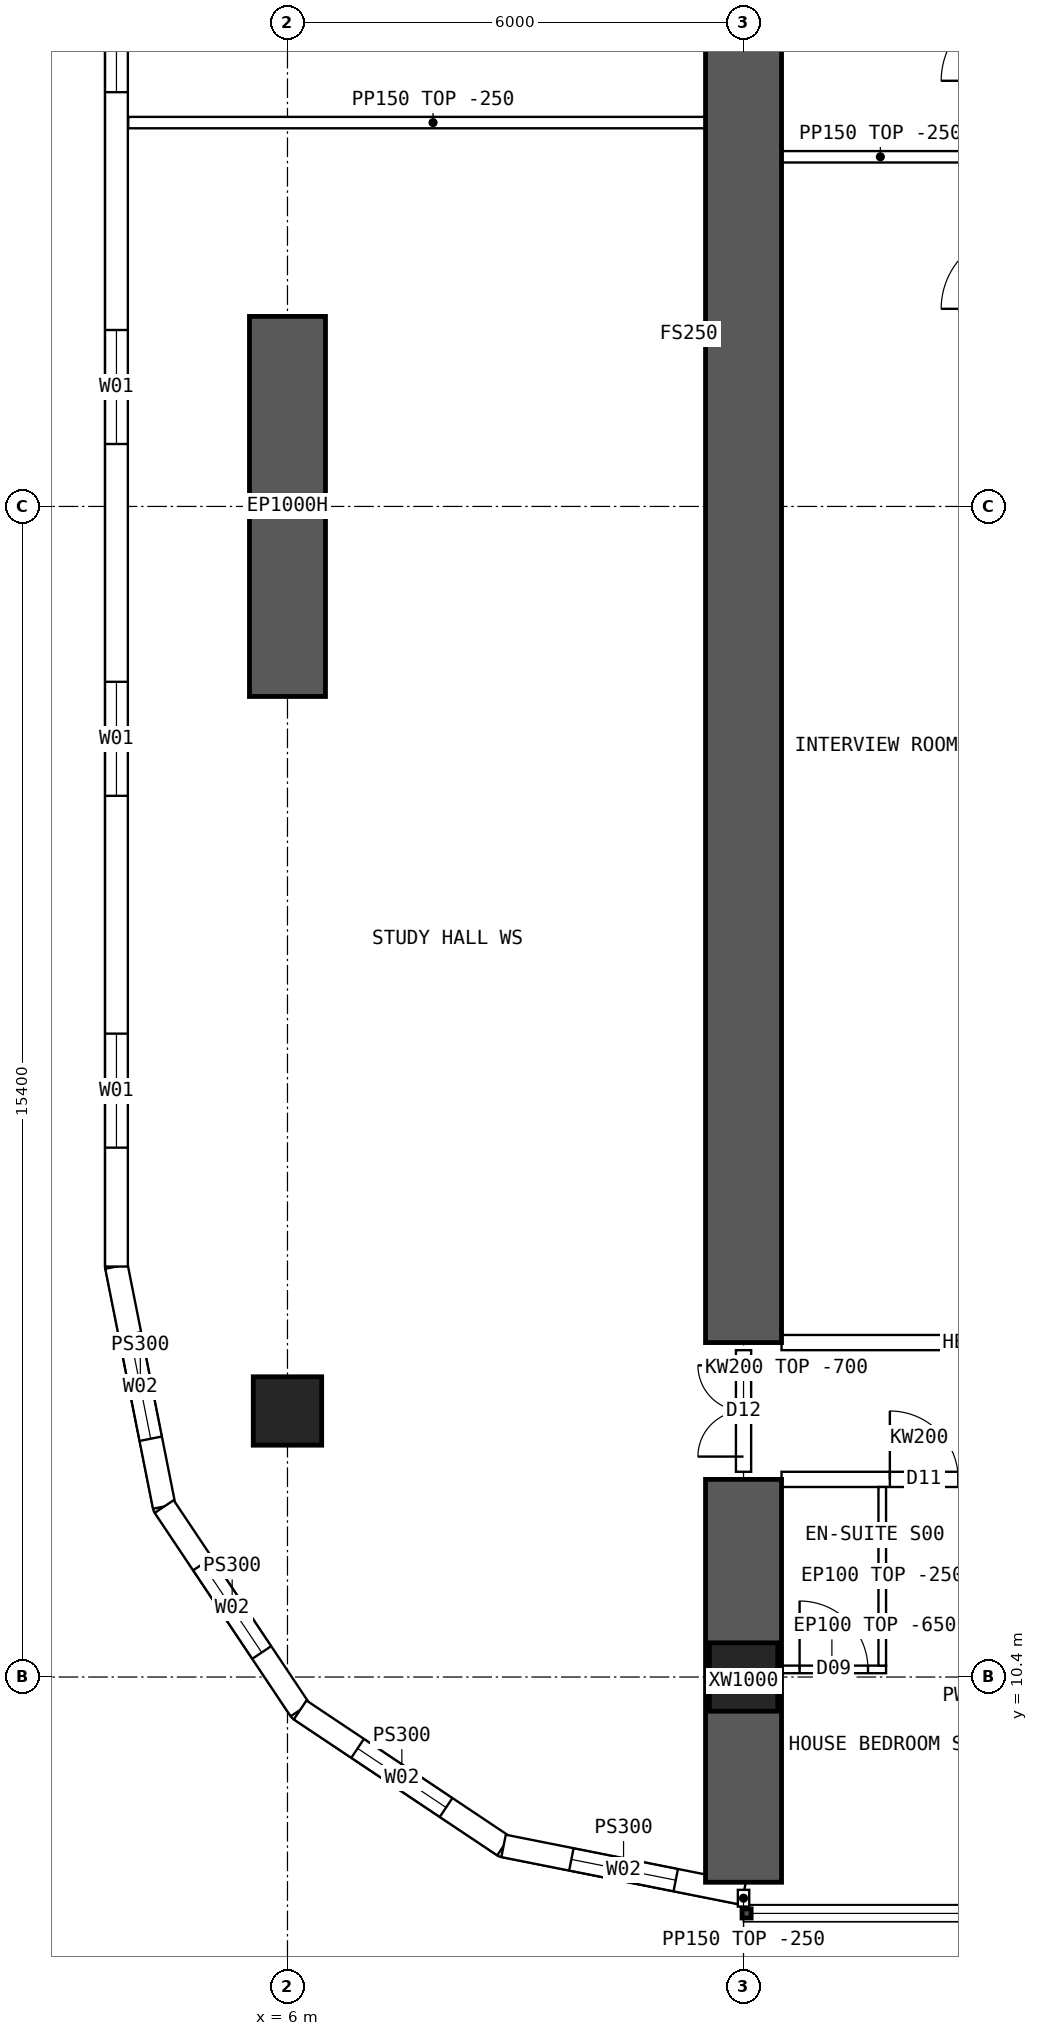
"""IFC4 building model, lengths in metres.
Left out: names, types, materials, properties, quantities, classifications, styles, units other than length and angle.
Written with IfcOpenShell. Run it as: python <this file> out.ifc"""

import sys

from ifc_helpers import new_model, si_unit, direction, frame, frame_2d, origin, origin_2d, place, context, subcontext, project, spatial, polyline, rectangle, hollow_rectangle, outline, extrude, element, fill, save


model = new_model("IFC4")
c1 = context("Model", 3, precision=1e-05, world=origin(), true_north=direction((0.0, 1.0)))
c2 = subcontext(c1, "Body", "Model", "MODEL_VIEW")
j1 = project(units=[si_unit("LENGTHUNIT", "METRE"), si_unit("PLANEANGLEUNIT", "RADIAN")], contexts=[c1])
p1 = place(None, origin())
s1 = spatial("IfcSite", under=j1, at=p1, CompositionType="ELEMENT")
p2 = place(p1, origin())
s2 = spatial("IfcBuilding", under=s1, at=p2, CompositionType="ELEMENT")
p3 = place(p2, frame((0.0, 0.0, 27.7)))
s3 = spatial("IfcBuildingStorey", under=s2, at=p3, CompositionType="ELEMENT", Elevation=27.7)
for number, where, z_axis, x_axis in (
    (1, (12.0, 10.4, 0.0), (0.0, 0.0, 1.0), (1.0, 0.0, 0.0)),
    (2, (6.0, 13.9, 0.0), (0.0, 0.0, 1.0), (1.0, 0.0, 0.0)),
):
    element("IfcColumn", number, at=place(p3, frame(where, z_axis=z_axis, x_axis=x_axis)), inside=s3, PredefinedType="COLUMN", context=c2, shape_type="SweptSolid", body=[
        extrude(hollow_rectangle(XDim=0.9, YDim=0.9, WallThickness=0.09, at=origin_2d()), origin(), (0.0, 0.0, 1.0), 3.75),
    ])
p4 = place(p3, frame((6.0, 23.3, 0.0), z_axis=(0.0, 0.0, 1.0), x_axis=(0.0, 1.0, 0.0)))
e3 = element("IfcWall", 3, at=p4, inside=s3, PredefinedType="SHEAR", context=c2, shape_type="SweptSolid", body=[
    extrude(rectangle(XDim=5.0, YDim=1.0, at=frame_2d((2.5, 0.0))), origin(), (0.0, 0.0, 1.0), 3.75),
])
p5 = place(p3, frame((12.0, 7.7, 0.0), z_axis=(0.0, 0.0, 1.0), x_axis=(0.0, 1.0, 0.0)))
e4 = element("IfcWall", 4, at=p5, inside=s3, PredefinedType="SHEAR", context=c2, shape_type="SweptSolid", body=[
    extrude(rectangle(XDim=5.3, YDim=1.0, at=frame_2d((2.65, 0.0))), origin(), (0.0, 0.0, 1.0), 3.75),
])
p6 = place(p3, frame((12.0, 14.8, 0.0), z_axis=(0.0, 0.0, 1.0), x_axis=(0.0, 1.0, 0.0)))
e5 = element("IfcWall", 5, at=p6, inside=s3, PredefinedType="SHEAR", context=c2, shape_type="SweptSolid", body=[
    extrude(rectangle(XDim=34.4, YDim=1.0, at=frame_2d((17.2, 0.0))), origin(), (0.0, 0.0, 1.0), 3.75),
])
p7 = place(p3, frame((3.75, 48.2, 0.0), z_axis=(0.0, 0.0, 1.0), x_axis=(0.0, -1.0, 0.0)))
e6 = element("IfcWall", 6, at=p7, inside=s3, PredefinedType="SOLIDWALL", context=c2, shape_type="SweptSolid", body=[
    extrude(outline(polyline([(-0.015, -0.15), (32.415, -0.15), (32.385, 0.15), (0.015, 0.15), (-0.015, -0.15)])), origin(), (0.0, 0.0, 1.0), 3.5),
])
p8 = place(p7, frame((1.564, 0.0, 0.9)))
e7 = element("IfcOpeningElement", 7, at=p8, cuts=e6, PredefinedType="OPENING", context=c2, shape_type="SweptSolid", body=[
    extrude(rectangle(XDim=1.5, YDim=2.0, at=frame_2d((0.75, 1.0))), frame((0.0, 0.16, 0.0), z_axis=(0.0, -1.0, 0.0), x_axis=(1.0, 0.0, 0.0)), (0.0, 0.0, 1.0), 0.32),
])
p9 = place(p7, frame((6.193, 0.0, 0.9)))
e8 = element("IfcOpeningElement", 8, at=p9, cuts=e6, PredefinedType="OPENING", context=c2, shape_type="SweptSolid", body=[
    extrude(rectangle(XDim=1.5, YDim=2.0, at=frame_2d((0.75, 1.0))), frame((0.0, 0.16, 0.0), z_axis=(0.0, -1.0, 0.0), x_axis=(1.0, 0.0, 0.0)), (0.0, 0.0, 1.0), 0.32),
])
p10 = place(p7, frame((10.822, 0.0, 0.9)))
e9 = element("IfcOpeningElement", 9, at=p10, cuts=e6, PredefinedType="OPENING", context=c2, shape_type="SweptSolid", body=[
    extrude(rectangle(XDim=1.5, YDim=2.0, at=frame_2d((0.75, 1.0))), frame((0.0, 0.16, 0.0), z_axis=(0.0, -1.0, 0.0), x_axis=(1.0, 0.0, 0.0)), (0.0, 0.0, 1.0), 0.32),
])
p11 = place(p7, frame((15.45, 0.0, 0.9)))
e10 = element("IfcOpeningElement", 10, at=p11, cuts=e6, PredefinedType="OPENING", context=c2, shape_type="SweptSolid", body=[
    extrude(rectangle(XDim=1.5, YDim=2.0, at=frame_2d((0.75, 1.0))), frame((0.0, 0.16, 0.0), z_axis=(0.0, -1.0, 0.0), x_axis=(1.0, 0.0, 0.0)), (0.0, 0.0, 1.0), 0.32),
])
p12 = place(p7, frame((20.079, 0.0, 0.9)))
e11 = element("IfcOpeningElement", 11, at=p12, cuts=e6, PredefinedType="OPENING", context=c2, shape_type="SweptSolid", body=[
    extrude(rectangle(XDim=1.5, YDim=2.0, at=frame_2d((0.75, 1.0))), frame((0.0, 0.16, 0.0), z_axis=(0.0, -1.0, 0.0), x_axis=(1.0, 0.0, 0.0)), (0.0, 0.0, 1.0), 0.32),
])
p13 = place(p7, frame((24.707, 0.0, 0.9)))
e12 = element("IfcOpeningElement", 12, at=p13, cuts=e6, PredefinedType="OPENING", context=c2, shape_type="SweptSolid", body=[
    extrude(rectangle(XDim=1.5, YDim=2.0, at=frame_2d((0.75, 1.0))), frame((0.0, 0.16, 0.0), z_axis=(0.0, -1.0, 0.0), x_axis=(1.0, 0.0, 0.0)), (0.0, 0.0, 1.0), 0.32),
])
p14 = place(p7, frame((29.336, 0.0, 0.9)))
e13 = element("IfcOpeningElement", 13, at=p14, cuts=e6, PredefinedType="OPENING", context=c2, shape_type="SweptSolid", body=[
    extrude(rectangle(XDim=1.5, YDim=2.0, at=frame_2d((0.75, 1.0))), frame((0.0, 0.16, 0.0), z_axis=(0.0, -1.0, 0.0), x_axis=(1.0, 0.0, 0.0)), (0.0, 0.0, 1.0), 0.32),
])
p15 = place(p3, frame((3.75, 15.8, 0.0), z_axis=(0.0, 0.0, 1.0), x_axis=(0.195065901187, -0.980790137692, 0.0)))
e14 = element("IfcWall", 14, at=p15, inside=s3, PredefinedType="SOLIDWALL", context=c2, shape_type="SweptSolid", body=[
    extrude(outline(polyline([(-0.015, -0.15), (3.249, -0.15), (3.189, 0.15), (0.015, 0.15), (-0.015, -0.15)])), origin(), (0.0, 0.0, 1.0), 3.5),
])
p16 = place(p15, frame((0.909, 0.0, 0.9)))
e15 = element("IfcOpeningElement", 15, at=p16, cuts=e14, PredefinedType="OPENING", context=c2, shape_type="SweptSolid", body=[
    extrude(rectangle(XDim=1.4, YDim=1.8, at=frame_2d((0.7, 0.9))), frame((0.0, 0.16, 0.0), z_axis=(0.0, -1.0, 0.0), x_axis=(1.0, 0.0, 0.0)), (0.0, 0.0, 1.0), 0.32),
])
p17 = place(p3, frame((4.378, 12.643, 0.0), z_axis=(0.0, 0.0, 1.0), x_axis=(0.555609954424, -0.831443069936, 0.0)))
e16 = element("IfcWall", 16, at=p17, inside=s3, PredefinedType="SOLIDWALL", context=c2, shape_type="SweptSolid", body=[
    extrude(outline(polyline([(-0.03, -0.15), (3.249, -0.15), (3.189, 0.15), (0.03, 0.15), (-0.03, -0.15)])), origin(), (0.0, 0.0, 1.0), 3.5),
])
p18 = place(p17, frame((0.909, 0.0, 0.9)))
e17 = element("IfcOpeningElement", 17, at=p18, cuts=e16, PredefinedType="OPENING", context=c2, shape_type="SweptSolid", body=[
    extrude(rectangle(XDim=1.4, YDim=1.8, at=frame_2d((0.7, 0.9))), frame((0.0, 0.16, 0.0), z_axis=(0.0, -1.0, 0.0), x_axis=(1.0, 0.0, 0.0)), (0.0, 0.0, 1.0), 0.32),
])
p19 = place(p3, frame((6.167, 9.966, 0.0), z_axis=(0.0, 0.0, 1.0), x_axis=(0.831478105043, -0.555557522525, 0.0)))
e18 = element("IfcWall", 18, at=p19, inside=s3, PredefinedType="SOLIDWALL", context=c2, shape_type="SweptSolid", body=[
    extrude(outline(polyline([(-0.03, -0.15), (3.249, -0.15), (3.189, 0.15), (0.03, 0.15), (-0.03, -0.15)])), origin(), (0.0, 0.0, 1.0), 3.5),
])
p20 = place(p19, frame((0.909, 0.0, 0.9)))
e19 = element("IfcOpeningElement", 19, at=p20, cuts=e18, PredefinedType="OPENING", context=c2, shape_type="SweptSolid", body=[
    extrude(rectangle(XDim=1.4, YDim=1.8, at=frame_2d((0.7, 0.9))), frame((0.0, 0.16, 0.0), z_axis=(0.0, -1.0, 0.0), x_axis=(1.0, 0.0, 0.0)), (0.0, 0.0, 1.0), 0.32),
])
p21 = place(p3, frame((8.843, 8.178, 0.0), z_axis=(0.0, 0.0, 1.0), x_axis=(0.980787251524, -0.195080412259, 0.0)))
e20 = element("IfcWall", 20, at=p21, inside=s3, PredefinedType="SOLIDWALL", context=c2, shape_type="SweptSolid", body=[
    extrude(outline(polyline([(-0.03, -0.15), (3.249, -0.15), (3.189, 0.15), (0.03, 0.15), (-0.03, -0.15)])), origin(), (0.0, 0.0, 1.0), 3.5),
])
p22 = place(p21, frame((0.909, 0.0, 0.9)))
e21 = element("IfcOpeningElement", 21, at=p22, cuts=e20, PredefinedType="OPENING", context=c2, shape_type="SweptSolid", body=[
    extrude(rectangle(XDim=1.4, YDim=1.8, at=frame_2d((0.7, 0.9))), frame((0.0, 0.16, 0.0), z_axis=(0.0, -1.0, 0.0), x_axis=(1.0, 0.0, 0.0)), (0.0, 0.0, 1.0), 0.32),
])
p23 = place(p3, frame((12.5, 13.0, 0.0), z_axis=(0.0, 0.0, 1.0), x_axis=(1.0, 0.0, 0.0)))
e22 = element("IfcWall", 22, at=p23, inside=s3, PredefinedType="SOLIDWALL", context=c2, shape_type="SweptSolid", body=[
    extrude(outline(polyline([(0.0, 0.0), (5.0, 0.0), (5.0, 3.1), (0.0, 3.1), (0.0, 0.0)])), frame((0.0, 0.1, 0.0), z_axis=(0.0, -1.0, 0.0), x_axis=(1.0, 0.0, 0.0)), (0.0, 0.0, 1.0), 0.2),
])
p24 = place(p23, frame((1.425, 0.0, 0.0)))
e23 = element("IfcOpeningElement", 23, at=p24, cuts=e22, PredefinedType="OPENING", context=c2, shape_type="SweptSolid", body=[
    extrude(rectangle(XDim=0.9, YDim=2.1, at=frame_2d((0.45, 1.05))), frame((0.0, 0.11, 0.0), z_axis=(0.0, -1.0, 0.0), x_axis=(1.0, 0.0, 0.0)), (0.0, 0.0, 1.0), 0.22),
])
p25 = place(p23, frame((2.675, 0.0, 0.0)))
e24 = element("IfcOpeningElement", 24, at=p25, cuts=e22, PredefinedType="OPENING", context=c2, shape_type="SweptSolid", body=[
    extrude(rectangle(XDim=0.9, YDim=2.1, at=frame_2d((0.45, 1.05))), frame((0.0, 0.11, 0.0), z_axis=(0.0, -1.0, 0.0), x_axis=(1.0, 0.0, 0.0)), (0.0, 0.0, 1.0), 0.22),
])
p26 = place(p3, frame((12.5, 14.8, 0.0), z_axis=(0.0, 0.0, 1.0), x_axis=(1.0, 0.0, 0.0)))
e25 = element("IfcWall", 25, at=p26, inside=s3, PredefinedType="SOLIDWALL", context=c2, shape_type="SweptSolid", body=[
    extrude(rectangle(XDim=5.0, YDim=0.2, at=frame_2d((2.5, 0.0))), origin(), (0.0, 0.0, 1.0), 3.5),
])
p27 = place(p26, frame((3.3, 0.0, 0.0)))
e26 = element("IfcOpeningElement", 26, at=p27, cuts=e25, PredefinedType="OPENING", context=c2, shape_type="SweptSolid", body=[
    extrude(rectangle(XDim=1.6, YDim=2.1, at=frame_2d((0.8, 1.05))), frame((0.0, 0.11, 0.0), z_axis=(0.0, -1.0, 0.0), x_axis=(1.0, 0.0, 0.0)), (0.0, 0.0, 1.0), 0.22),
])
p28 = place(p3, frame((13.875, 10.5, 0.0), z_axis=(0.0, 0.0, 1.0), x_axis=(-1.0, 0.0, 0.0)))
e27 = element("IfcWall", 27, at=p28, inside=s3, PredefinedType="PARTITIONING", context=c2, shape_type="SweptSolid", body=[
    extrude(outline(polyline([(0.0, 0.0), (1.425, 0.0), (1.425, 3.1), (0.0, 3.1), (0.0, 0.0)])), frame((0.0, 0.05, 0.0), z_axis=(0.0, -1.0, 0.0), x_axis=(1.0, 0.0, 0.0)), (0.0, 0.0, 1.0), 0.1),
])
p29 = place(p28, frame((0.238, 0.0, 0.0)))
e28 = element("IfcOpeningElement", 28, at=p29, cuts=e27, PredefinedType="OPENING", context=c2, shape_type="SweptSolid", body=[
    extrude(rectangle(XDim=0.9, YDim=2.1, at=frame_2d((0.45, 1.05))), frame((0.0, 0.06, 0.0), z_axis=(0.0, -1.0, 0.0), x_axis=(1.0, 0.0, 0.0)), (0.0, 0.0, 1.0), 0.12),
])
p30 = place(p3, frame((13.825, 10.55, 0.0), z_axis=(0.0, 0.0, 1.0), x_axis=(0.0, 1.0, 0.0)))
e29 = element("IfcWall", 29, at=p30, inside=s3, PredefinedType="PARTITIONING", context=c2, shape_type="SweptSolid", body=[
    extrude(outline(polyline([(0.0, 0.0), (2.35, 0.0), (2.35, 3.1), (2.302, 3.1), (2.3, 3.5), (0.052, 3.5), (0.05, 3.1), (0.0, 3.1), (0.0, 0.0)])), frame((0.0, 0.05, 0.0), z_axis=(0.0, -1.0, 0.0), x_axis=(1.0, 0.0, 0.0)), (0.0, 0.0, 1.0), 0.1),
])
p31 = place(p3, frame((12.0, 30.4, 0.0), z_axis=(0.0, 0.0, 1.0), x_axis=(1.0, 0.0, 0.0)))
e30 = element("IfcWall", 30, at=p31, inside=s3, PredefinedType="PARTITIONING", context=c2, shape_type="SweptSolid", body=[
    extrude(rectangle(XDim=3.6, YDim=0.15, at=frame_2d((1.8, 0.0))), origin(), (0.0, 0.0, 1.0), 3.5),
])
p32 = place(p3, frame((3.905, 30.85, 0.0), z_axis=(0.0, 0.0, 1.0), x_axis=(1.0, 0.0, 0.0)))
e31 = element("IfcWall", 31, at=p32, inside=s3, PredefinedType="PARTITIONING", context=c2, shape_type="SweptSolid", body=[
    extrude(outline(polyline([(0.0, 0.0), (8.02, 0.0), (8.02, 3.5), (2.397, 3.5), (2.395, 3.05), (1.797, 3.05), (1.795, 3.5), (0.0, 3.5), (0.0, 0.0)])), frame((0.0, 0.075, 0.0), z_axis=(0.0, -1.0, 0.0), x_axis=(1.0, 0.0, 0.0)), (0.0, 0.0, 1.0), 0.15),
])
p33 = place(p3, frame((12.0, 13.1, 0.0), z_axis=(0.0, 0.0, 1.0), x_axis=(0.0, 1.0, 0.0)))
e32 = element("IfcWall", 32, at=p33, inside=s3, PredefinedType="SOLIDWALL", context=c2, shape_type="SweptSolid", body=[
    extrude(outline(polyline([(0.0, 0.0), (1.6, 0.0), (1.6, 3.05), (0.0, 3.05), (0.0, 0.0)])), frame((0.0, 0.1, 0.0), z_axis=(0.0, -1.0, 0.0), x_axis=(1.0, 0.0, 0.0)), (0.0, 0.0, 1.0), 0.2),
])
p34 = place(p33, frame((0.2, 0.0, 0.0)))
e33 = element("IfcOpeningElement", 33, at=p34, cuts=e32, PredefinedType="OPENING", context=c2, shape_type="SweptSolid", body=[
    extrude(rectangle(XDim=1.2, YDim=2.1, at=frame_2d((0.6, 1.05))), frame((0.0, 0.11, 0.0), z_axis=(0.0, -1.0, 0.0), x_axis=(1.0, 0.0, 0.0)), (0.0, 0.0, 1.0), 0.22),
])
p35 = place(p3, frame((12.0, 7.6, 0.0), z_axis=(0.0, 0.0, 1.0), x_axis=(0.0, -1.0, 0.0)))
e34 = element("IfcWall", 34, at=p35, inside=s3, PredefinedType="PARTITIONING", context=c2, shape_type="SweptSolid", body=[
    extrude(rectangle(XDim=0.22, YDim=0.15, at=frame_2d((0.11, 0.0))), origin(), (0.0, 0.0, 1.0), 3.5),
])
p36 = place(p11, origin())
e35 = element("IfcWindow", 35, at=p36, inside=s3, PartitioningType="SINGLE_PANEL", PredefinedType="WINDOW", context=c2, shape_type="SweptSolid", body=[
    extrude(rectangle(XDim=1.5, YDim=2.0, at=frame_2d((0.75, 1.0))), frame((0.0, 0.03, 0.0), z_axis=(0.0, -1.0, 0.0), x_axis=(1.0, 0.0, 0.0)), (0.0, 0.0, 1.0), 0.06),
])
fill(e10, e35)
p37 = place(p12, origin())
e36 = element("IfcWindow", 36, at=p37, inside=s3, PartitioningType="SINGLE_PANEL", PredefinedType="WINDOW", context=c2, shape_type="SweptSolid", body=[
    extrude(rectangle(XDim=1.5, YDim=2.0, at=frame_2d((0.75, 1.0))), frame((0.0, 0.03, 0.0), z_axis=(0.0, -1.0, 0.0), x_axis=(1.0, 0.0, 0.0)), (0.0, 0.0, 1.0), 0.06),
])
fill(e11, e36)
p38 = place(p13, origin())
e37 = element("IfcWindow", 37, at=p38, inside=s3, PartitioningType="SINGLE_PANEL", PredefinedType="WINDOW", context=c2, shape_type="SweptSolid", body=[
    extrude(rectangle(XDim=1.5, YDim=2.0, at=frame_2d((0.75, 1.0))), frame((0.0, 0.03, 0.0), z_axis=(0.0, -1.0, 0.0), x_axis=(1.0, 0.0, 0.0)), (0.0, 0.0, 1.0), 0.06),
])
fill(e12, e37)
p39 = place(p14, origin())
e38 = element("IfcWindow", 38, at=p39, inside=s3, PartitioningType="SINGLE_PANEL", PredefinedType="WINDOW", context=c2, shape_type="SweptSolid", body=[
    extrude(rectangle(XDim=1.5, YDim=2.0, at=frame_2d((0.75, 1.0))), frame((0.0, 0.03, 0.0), z_axis=(0.0, -1.0, 0.0), x_axis=(1.0, 0.0, 0.0)), (0.0, 0.0, 1.0), 0.06),
])
fill(e13, e38)
p40 = place(p16, origin())
e39 = element("IfcWindow", 39, at=p40, inside=s3, PartitioningType="SINGLE_PANEL", PredefinedType="WINDOW", context=c2, shape_type="SweptSolid", body=[
    extrude(rectangle(XDim=1.4, YDim=1.8, at=frame_2d((0.7, 0.9))), frame((0.0, 0.03, 0.0), z_axis=(0.0, -1.0, 0.0), x_axis=(1.0, 0.0, 0.0)), (0.0, 0.0, 1.0), 0.06),
])
fill(e15, e39)
p41 = place(p18, origin())
e40 = element("IfcWindow", 40, at=p41, inside=s3, PartitioningType="SINGLE_PANEL", PredefinedType="WINDOW", context=c2, shape_type="SweptSolid", body=[
    extrude(rectangle(XDim=1.4, YDim=1.8, at=frame_2d((0.7, 0.9))), frame((0.0, 0.03, 0.0), z_axis=(0.0, -1.0, 0.0), x_axis=(1.0, 0.0, 0.0)), (0.0, 0.0, 1.0), 0.06),
])
fill(e17, e40)
p42 = place(p20, origin())
e41 = element("IfcWindow", 41, at=p42, inside=s3, PartitioningType="SINGLE_PANEL", PredefinedType="WINDOW", context=c2, shape_type="SweptSolid", body=[
    extrude(rectangle(XDim=1.4, YDim=1.8, at=frame_2d((0.7, 0.9))), frame((0.0, 0.03, 0.0), z_axis=(0.0, -1.0, 0.0), x_axis=(1.0, 0.0, 0.0)), (0.0, 0.0, 1.0), 0.06),
])
fill(e19, e41)
p43 = place(p22, origin())
e42 = element("IfcWindow", 42, at=p43, inside=s3, PartitioningType="SINGLE_PANEL", PredefinedType="WINDOW", context=c2, shape_type="SweptSolid", body=[
    extrude(rectangle(XDim=1.4, YDim=1.8, at=frame_2d((0.7, 0.9))), frame((0.0, 0.03, 0.0), z_axis=(0.0, -1.0, 0.0), x_axis=(1.0, 0.0, 0.0)), (0.0, 0.0, 1.0), 0.06),
])
fill(e21, e42)
p44 = place(p29, origin())
e43 = element("IfcDoor", 43, at=p44, inside=s3, OperationType="SINGLE_SWING_RIGHT", PredefinedType="DOOR", context=c2, shape_type="SweptSolid", body=[
    extrude(rectangle(XDim=0.9, YDim=2.1, at=frame_2d((0.45, 1.05))), frame((0.0, 0.025, 0.0), z_axis=(0.0, -1.0, 0.0), x_axis=(1.0, 0.0, 0.0)), (0.0, 0.0, 1.0), 0.05),
])
fill(e28, e43)
p45 = place(p24, origin())
e44 = element("IfcDoor", 44, at=p45, inside=s3, OperationType="SINGLE_SWING_LEFT", PredefinedType="DOOR", context=c2, shape_type="SweptSolid", body=[
    extrude(rectangle(XDim=0.9, YDim=2.1, at=frame_2d((0.45, 1.05))), frame((0.0, 0.025, 0.0), z_axis=(0.0, -1.0, 0.0), x_axis=(1.0, 0.0, 0.0)), (0.0, 0.0, 1.0), 0.05),
])
fill(e23, e44)
p46 = place(p34, origin())
e45 = element("IfcDoor", 45, at=p46, inside=s3, OperationType="DOUBLE_DOOR_SINGLE_SWING", PredefinedType="DOOR", context=c2, shape_type="SweptSolid", body=[
    extrude(rectangle(XDim=1.2, YDim=2.1, at=frame_2d((0.6, 1.05))), frame((0.0, 0.025, 0.0), z_axis=(0.0, -1.0, 0.0), x_axis=(1.0, 0.0, 0.0)), (0.0, 0.0, 1.0), 0.05),
])
fill(e33, e45)
save(model, sys.argv[1])
